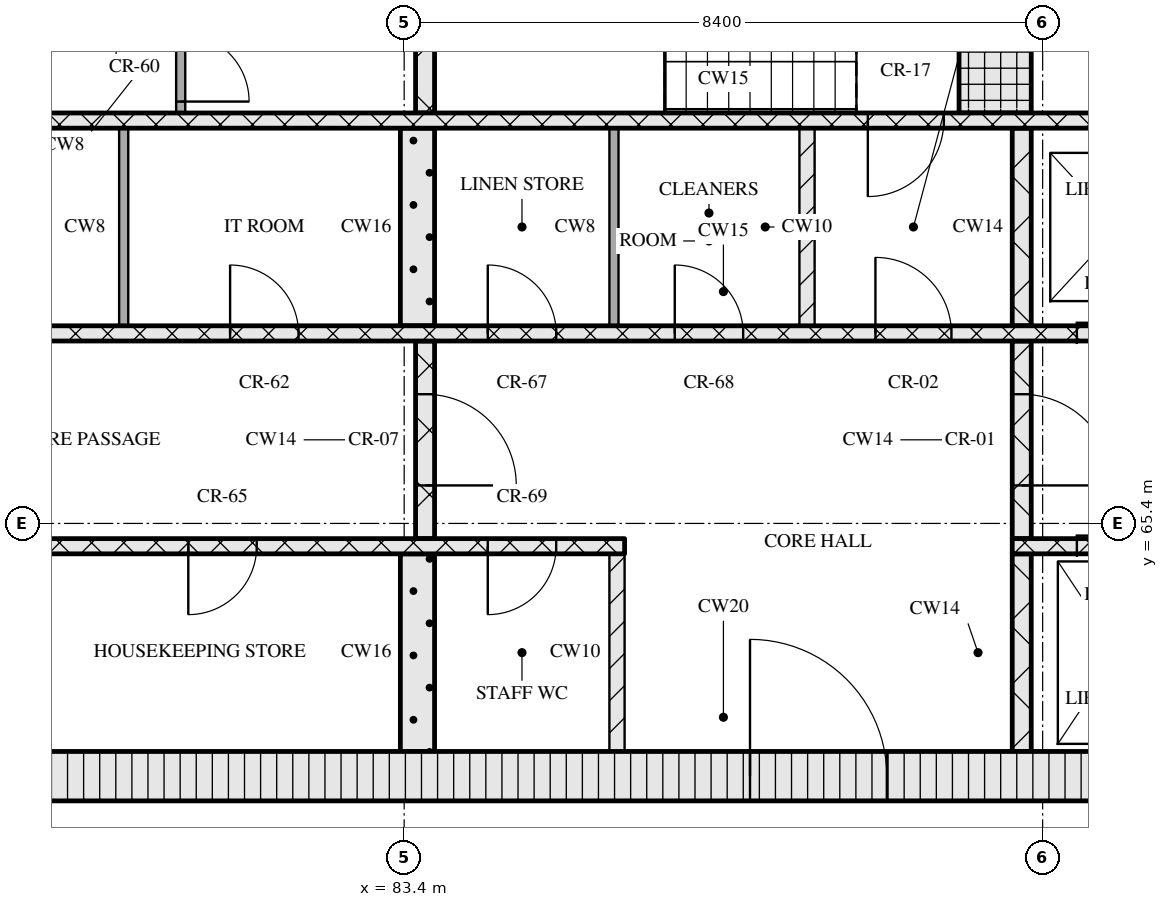
"""IFC4 building model, lengths in metres.
Left out: names, types, materials, properties, quantities, classifications, styles, units other than length and angle.
Written with IfcOpenShell. Run it as: python <this file> out.ifc"""

import sys

from ifc_helpers import new_model, si_unit, direction, frame, frame_2d, origin, place, context, subcontext, project, spatial, rectangle, extrude, element, fill, save


model = new_model("IFC4")
c1 = context("Model", 3, precision=1e-05, world=origin(), true_north=direction((0.0, 1.0)))
c2 = subcontext(c1, "Body", "Model", "MODEL_VIEW")
j1 = project(units=[si_unit("LENGTHUNIT", "METRE"), si_unit("PLANEANGLEUNIT", "RADIAN")], contexts=[c1])
p1 = place(None, origin())
s1 = spatial("IfcSite", under=j1, at=p1, CompositionType="ELEMENT")
p2 = place(p1, origin())
s2 = spatial("IfcBuilding", under=s1, at=p2, CompositionType="ELEMENT")
p3 = place(p2, frame((0.0, 0.0, 230.7)))
s3 = spatial("IfcBuildingStorey", under=s2, at=p3, CompositionType="ELEMENT", Elevation=230.7)
p4 = place(p3, frame((67.15, 62.075, 0.0), z_axis=(0.0, 0.0, 1.0), x_axis=(1.0, 0.0, 0.0)))
e1 = element("IfcWall", 1, at=p4, inside=s3, PredefinedType="SOLIDWALL", context=c2, shape_type="SweptSolid", body=[
    extrude(rectangle(XDim=40.9, YDim=0.65, at=frame_2d((20.45, 0.0))), origin(), (0.0, 0.0, 1.0), 3.32),
])
p5 = place(p4, frame((20.8, 0.0, 0.0)))
e2 = element("IfcOpeningElement", 2, at=p5, cuts=e1, PredefinedType="OPENING", context=c2, shape_type="SweptSolid", body=[
    extrude(rectangle(XDim=1.8, YDim=2.1, at=frame_2d((0.9, 1.05))), frame((0.0, 0.335, 0.0), z_axis=(0.0, -1.0, 0.0), x_axis=(1.0, 0.0, 0.0)), (0.0, 0.0, 1.0), 0.67),
])
p6 = place(p3, frame((83.575, 62.4, 0.0), z_axis=(0.0, 0.0, 1.0), x_axis=(0.0, 1.0, 0.0)))
e3 = element("IfcWall", 3, at=p6, inside=s3, PredefinedType="SOLIDWALL", context=c2, shape_type="SweptSolid", body=[
    extrude(rectangle(XDim=2.6, YDim=0.45, at=frame_2d((1.3, 0.0))), origin(), (0.0, 0.0, 1.0), 3.32),
])
p7 = place(p3, frame((86.2, 62.4, 0.0), z_axis=(0.0, 0.0, 1.0), x_axis=(0.0, 1.0, 0.0)))
e4 = element("IfcWall", 4, at=p7, inside=s3, PredefinedType="PARTITIONING", context=c2, shape_type="SweptSolid", body=[
    extrude(rectangle(XDim=2.6, YDim=0.2, at=frame_2d((1.3, 0.0))), origin(), (0.0, 0.0, 1.0), 3.32),
])
p8 = place(p3, frame((91.525, 62.4, 0.0), z_axis=(0.0, 0.0, 1.0), x_axis=(0.0, 1.0, 0.0)))
e5 = element("IfcWall", 5, at=p8, inside=s3, PredefinedType="SOLIDWALL", context=c2, shape_type="SweptSolid", body=[
    extrude(rectangle(XDim=2.6, YDim=0.25, at=frame_2d((1.3, 0.0))), origin(), (0.0, 0.0, 1.0), 3.32),
])
p9 = place(p3, frame((67.8, 65.1, 0.0), z_axis=(0.0, 0.0, 1.0), x_axis=(1.0, 0.0, 0.0)))
e6 = element("IfcWall", 6, at=p9, inside=s3, PredefinedType="SOLIDWALL", context=c2, shape_type="SweptSolid", body=[
    extrude(rectangle(XDim=18.5, YDim=0.2, at=frame_2d((9.25, 0.0))), origin(), (0.0, 0.0, 1.0), 3.32),
])
p10 = place(p9, frame((7.27, 0.0, 0.0)))
e7 = element("IfcOpeningElement", 7, at=p10, cuts=e6, PredefinedType="OPENING", context=c2, shape_type="SweptSolid", body=[
    extrude(rectangle(XDim=0.9, YDim=2.1, at=frame_2d((0.45, 1.05))), frame((0.0, 0.11, 0.0), z_axis=(0.0, -1.0, 0.0), x_axis=(1.0, 0.0, 0.0)), (0.0, 0.0, 1.0), 0.22),
])
p11 = place(p9, frame((9.05, 0.0, 0.0)))
e8 = element("IfcOpeningElement", 8, at=p11, cuts=e6, PredefinedType="OPENING", context=c2, shape_type="SweptSolid", body=[
    extrude(rectangle(XDim=0.9, YDim=2.1, at=frame_2d((0.45, 1.05))), frame((0.0, 0.11, 0.0), z_axis=(0.0, -1.0, 0.0), x_axis=(1.0, 0.0, 0.0)), (0.0, 0.0, 1.0), 0.22),
])
p12 = place(p9, frame((12.76, 0.0, 0.0)))
e9 = element("IfcOpeningElement", 9, at=p12, cuts=e6, PredefinedType="OPENING", context=c2, shape_type="SweptSolid", body=[
    extrude(rectangle(XDim=0.9, YDim=2.1, at=frame_2d((0.45, 1.05))), frame((0.0, 0.11, 0.0), z_axis=(0.0, -1.0, 0.0), x_axis=(1.0, 0.0, 0.0)), (0.0, 0.0, 1.0), 0.22),
])
p13 = place(p9, frame((16.7, 0.0, 0.0)))
e10 = element("IfcOpeningElement", 10, at=p13, cuts=e6, PredefinedType="OPENING", context=c2, shape_type="SweptSolid", body=[
    extrude(rectangle(XDim=0.9, YDim=2.1, at=frame_2d((0.45, 1.05))), frame((0.0, 0.11, 0.0), z_axis=(0.0, -1.0, 0.0), x_axis=(1.0, 0.0, 0.0)), (0.0, 0.0, 1.0), 0.22),
])
p14 = place(p3, frame((91.4, 65.1, 0.0), z_axis=(0.0, 0.0, 1.0), x_axis=(1.0, 0.0, 0.0)))
e11 = element("IfcWall", 11, at=p14, inside=s3, PredefinedType="SOLIDWALL", context=c2, shape_type="SweptSolid", body=[
    extrude(rectangle(XDim=16.0, YDim=0.2, at=frame_2d((8.0, 0.0))), origin(), (0.0, 0.0, 1.0), 3.32),
])
p15 = place(p14, frame((0.85, 0.0, 0.0)))
e12 = element("IfcOpeningElement", 12, at=p15, cuts=e11, PredefinedType="OPENING", context=c2, shape_type="SweptSolid", body=[
    extrude(rectangle(XDim=1.1, YDim=2.1, at=frame_2d((0.55, 1.05))), frame((0.0, 0.11, 0.0), z_axis=(0.0, -1.0, 0.0), x_axis=(1.0, 0.0, 0.0)), (0.0, 0.0, 1.0), 0.22),
])
p16 = place(p14, frame((3.35, 0.0, 0.0)))
e13 = element("IfcOpeningElement", 13, at=p16, cuts=e11, PredefinedType="OPENING", context=c2, shape_type="SweptSolid", body=[
    extrude(rectangle(XDim=1.1, YDim=2.1, at=frame_2d((0.55, 1.05))), frame((0.0, 0.11, 0.0), z_axis=(0.0, -1.0, 0.0), x_axis=(1.0, 0.0, 0.0)), (0.0, 0.0, 1.0), 0.22),
])
p17 = place(p14, frame((5.85, 0.0, 0.0)))
e14 = element("IfcOpeningElement", 14, at=p17, cuts=e11, PredefinedType="OPENING", context=c2, shape_type="SweptSolid", body=[
    extrude(rectangle(XDim=1.1, YDim=2.1, at=frame_2d((0.55, 1.05))), frame((0.0, 0.11, 0.0), z_axis=(0.0, -1.0, 0.0), x_axis=(1.0, 0.0, 0.0)), (0.0, 0.0, 1.0), 0.22),
])
p18 = place(p14, frame((7.83, 0.0, 0.0)))
e15 = element("IfcOpeningElement", 15, at=p18, cuts=e11, PredefinedType="OPENING", context=c2, shape_type="SweptSolid", body=[
    extrude(rectangle(XDim=0.9, YDim=2.1, at=frame_2d((0.45, 1.05))), frame((0.0, 0.11, 0.0), z_axis=(0.0, -1.0, 0.0), x_axis=(1.0, 0.0, 0.0)), (0.0, 0.0, 1.0), 0.22),
])
p19 = place(p3, frame((83.675, 65.2, 0.0), z_axis=(0.0, 0.0, 1.0), x_axis=(0.0, 1.0, 0.0)))
e16 = element("IfcWall", 16, at=p19, inside=s3, PredefinedType="SOLIDWALL", context=c2, shape_type="SweptSolid", body=[
    extrude(rectangle(XDim=2.6, YDim=0.25, at=frame_2d((1.3, 0.0))), origin(), (0.0, 0.0, 1.0), 3.32),
])
p20 = place(p19, frame((0.7, 0.0, 0.0)))
e17 = element("IfcOpeningElement", 17, at=p20, cuts=e16, PredefinedType="OPENING", context=c2, shape_type="SweptSolid", body=[
    extrude(rectangle(XDim=1.2, YDim=2.1, at=frame_2d((0.6, 1.05))), frame((0.0, 0.135, 0.0), z_axis=(0.0, -1.0, 0.0), x_axis=(1.0, 0.0, 0.0)), (0.0, 0.0, 1.0), 0.27),
])
p21 = place(p3, frame((91.525, 65.2, 0.0), z_axis=(0.0, 0.0, 1.0), x_axis=(0.0, 1.0, 0.0)))
e18 = element("IfcWall", 18, at=p21, inside=s3, PredefinedType="SOLIDWALL", context=c2, shape_type="SweptSolid", body=[
    extrude(rectangle(XDim=2.6, YDim=0.25, at=frame_2d((1.3, 0.0))), origin(), (0.0, 0.0, 1.0), 3.32),
])
p22 = place(p21, frame((0.7, 0.0, 0.0)))
e19 = element("IfcOpeningElement", 19, at=p22, cuts=e18, PredefinedType="OPENING", context=c2, shape_type="SweptSolid", body=[
    extrude(rectangle(XDim=1.2, YDim=2.1, at=frame_2d((0.6, 1.05))), frame((0.0, 0.135, 0.0), z_axis=(0.0, -1.0, 0.0), x_axis=(1.0, 0.0, 0.0)), (0.0, 0.0, 1.0), 0.27),
])
p23 = place(p3, frame((76.05, 67.9, 0.0), z_axis=(0.0, 0.0, 1.0), x_axis=(1.0, 0.0, 0.0)))
e20 = element("IfcWall", 20, at=p23, inside=s3, PredefinedType="SOLIDWALL", context=c2, shape_type="SweptSolid", body=[
    extrude(rectangle(XDim=23.1, YDim=0.2, at=frame_2d((11.55, 0.0))), origin(), (0.0, 0.0, 1.0), 3.32),
])
p24 = place(p23, frame((1.35, 0.0, 0.0)))
e21 = element("IfcOpeningElement", 21, at=p24, cuts=e20, PredefinedType="OPENING", context=c2, shape_type="SweptSolid", body=[
    extrude(rectangle(XDim=0.9, YDim=2.1, at=frame_2d((0.45, 1.05))), frame((0.0, 0.11, 0.0), z_axis=(0.0, -1.0, 0.0), x_axis=(1.0, 0.0, 0.0)), (0.0, 0.0, 1.0), 0.22),
])
p25 = place(p23, frame((5.06, 0.0, 0.0)))
e22 = element("IfcOpeningElement", 22, at=p25, cuts=e20, PredefinedType="OPENING", context=c2, shape_type="SweptSolid", body=[
    extrude(rectangle(XDim=0.9, YDim=2.1, at=frame_2d((0.45, 1.05))), frame((0.0, 0.11, 0.0), z_axis=(0.0, -1.0, 0.0), x_axis=(1.0, 0.0, 0.0)), (0.0, 0.0, 1.0), 0.22),
])
p26 = place(p23, frame((8.45, 0.0, 0.0)))
e23 = element("IfcOpeningElement", 23, at=p26, cuts=e20, PredefinedType="OPENING", context=c2, shape_type="SweptSolid", body=[
    extrude(rectangle(XDim=0.9, YDim=2.1, at=frame_2d((0.45, 1.05))), frame((0.0, 0.11, 0.0), z_axis=(0.0, -1.0, 0.0), x_axis=(1.0, 0.0, 0.0)), (0.0, 0.0, 1.0), 0.22),
])
p27 = place(p23, frame((10.91, 0.0, 0.0)))
e24 = element("IfcOpeningElement", 24, at=p27, cuts=e20, PredefinedType="OPENING", context=c2, shape_type="SweptSolid", body=[
    extrude(rectangle(XDim=0.9, YDim=2.1, at=frame_2d((0.45, 1.05))), frame((0.0, 0.11, 0.0), z_axis=(0.0, -1.0, 0.0), x_axis=(1.0, 0.0, 0.0)), (0.0, 0.0, 1.0), 0.22),
])
p28 = place(p23, frame((13.55, 0.0, 0.0)))
e25 = element("IfcOpeningElement", 25, at=p28, cuts=e20, PredefinedType="OPENING", context=c2, shape_type="SweptSolid", body=[
    extrude(rectangle(XDim=1.0, YDim=2.1, at=frame_2d((0.5, 1.05))), frame((0.0, 0.11, 0.0), z_axis=(0.0, -1.0, 0.0), x_axis=(1.0, 0.0, 0.0)), (0.0, 0.0, 1.0), 0.22),
])
p29 = place(p23, frame((16.2, 0.0, 0.0)))
e26 = element("IfcOpeningElement", 26, at=p29, cuts=e20, PredefinedType="OPENING", context=c2, shape_type="SweptSolid", body=[
    extrude(rectangle(XDim=1.1, YDim=2.1, at=frame_2d((0.55, 1.05))), frame((0.0, 0.11, 0.0), z_axis=(0.0, -1.0, 0.0), x_axis=(1.0, 0.0, 0.0)), (0.0, 0.0, 1.0), 0.22),
])
p30 = place(p23, frame((18.7, 0.0, 0.0)))
e27 = element("IfcOpeningElement", 27, at=p30, cuts=e20, PredefinedType="OPENING", context=c2, shape_type="SweptSolid", body=[
    extrude(rectangle(XDim=1.1, YDim=2.1, at=frame_2d((0.55, 1.05))), frame((0.0, 0.11, 0.0), z_axis=(0.0, -1.0, 0.0), x_axis=(1.0, 0.0, 0.0)), (0.0, 0.0, 1.0), 0.22),
])
p31 = place(p23, frame((21.2, 0.0, 0.0)))
e28 = element("IfcOpeningElement", 28, at=p31, cuts=e20, PredefinedType="OPENING", context=c2, shape_type="SweptSolid", body=[
    extrude(rectangle(XDim=1.1, YDim=2.1, at=frame_2d((0.55, 1.05))), frame((0.0, 0.11, 0.0), z_axis=(0.0, -1.0, 0.0), x_axis=(1.0, 0.0, 0.0)), (0.0, 0.0, 1.0), 0.22),
])
p32 = place(p3, frame((79.71, 68.0, 0.0), z_axis=(0.0, 0.0, 1.0), x_axis=(0.0, 1.0, 0.0)))
e29 = element("IfcWall", 29, at=p32, inside=s3, PredefinedType="PARTITIONING", context=c2, shape_type="SweptSolid", body=[
    extrude(rectangle(XDim=2.6, YDim=0.12, at=frame_2d((1.3, 0.0))), origin(), (0.0, 0.0, 1.0), 3.32),
])
p33 = place(p3, frame((83.575, 68.0, 0.0), z_axis=(0.0, 0.0, 1.0), x_axis=(0.0, 1.0, 0.0)))
e30 = element("IfcWall", 30, at=p33, inside=s3, PredefinedType="SOLIDWALL", context=c2, shape_type="SweptSolid", body=[
    extrude(rectangle(XDim=2.6, YDim=0.45, at=frame_2d((1.3, 0.0))), origin(), (0.0, 0.0, 1.0), 3.32),
])
p34 = place(p3, frame((86.16, 68.0, 0.0), z_axis=(0.0, 0.0, 1.0), x_axis=(0.0, 1.0, 0.0)))
e31 = element("IfcWall", 31, at=p34, inside=s3, PredefinedType="PARTITIONING", context=c2, shape_type="SweptSolid", body=[
    extrude(rectangle(XDim=2.6, YDim=0.12, at=frame_2d((1.3, 0.0))), origin(), (0.0, 0.0, 1.0), 3.32),
])
p35 = place(p3, frame((88.7, 68.0, 0.0), z_axis=(0.0, 0.0, 1.0), x_axis=(0.0, 1.0, 0.0)))
e32 = element("IfcWall", 32, at=p35, inside=s3, PredefinedType="PARTITIONING", context=c2, shape_type="SweptSolid", body=[
    extrude(rectangle(XDim=2.6, YDim=0.2, at=frame_2d((1.3, 0.0))), origin(), (0.0, 0.0, 1.0), 3.32),
])
p36 = place(p3, frame((91.525, 68.0, 0.0), z_axis=(0.0, 0.0, 1.0), x_axis=(0.0, 1.0, 0.0)))
e33 = element("IfcWall", 33, at=p36, inside=s3, PredefinedType="SOLIDWALL", context=c2, shape_type="SweptSolid", body=[
    extrude(rectangle(XDim=2.6, YDim=0.25, at=frame_2d((1.3, 0.0))), origin(), (0.0, 0.0, 1.0), 3.32),
])
p37 = place(p3, frame((67.8, 70.7, 0.0), z_axis=(0.0, 0.0, 1.0), x_axis=(1.0, 0.0, 0.0)))
e34 = element("IfcWall", 34, at=p37, inside=s3, PredefinedType="SOLIDWALL", context=c2, shape_type="SweptSolid", body=[
    extrude(rectangle(XDim=39.6, YDim=0.2, at=frame_2d((19.8, 0.0))), origin(), (0.0, 0.0, 1.0), 3.32),
])
p38 = place(p37, frame((0.65, 0.0, 0.0)))
e35 = element("IfcOpeningElement", 35, at=p38, cuts=e34, PredefinedType="OPENING", context=c2, shape_type="SweptSolid", body=[
    extrude(rectangle(XDim=1.1, YDim=2.1, at=frame_2d((0.55, 1.05))), frame((0.0, 0.11, 0.0), z_axis=(0.0, -1.0, 0.0), x_axis=(1.0, 0.0, 0.0)), (0.0, 0.0, 1.0), 0.22),
])
p39 = place(p37, frame((3.25, 0.0, 0.0)))
e36 = element("IfcOpeningElement", 36, at=p39, cuts=e34, PredefinedType="OPENING", context=c2, shape_type="SweptSolid", body=[
    extrude(rectangle(XDim=1.1, YDim=2.1, at=frame_2d((0.55, 1.05))), frame((0.0, 0.11, 0.0), z_axis=(0.0, -1.0, 0.0), x_axis=(1.0, 0.0, 0.0)), (0.0, 0.0, 1.0), 0.22),
])
p40 = place(p37, frame((5.9, 0.0, 0.0)))
e37 = element("IfcOpeningElement", 37, at=p40, cuts=e34, PredefinedType="OPENING", context=c2, shape_type="SweptSolid", body=[
    extrude(rectangle(XDim=1.0, YDim=2.1, at=frame_2d((0.5, 1.05))), frame((0.0, 0.11, 0.0), z_axis=(0.0, -1.0, 0.0), x_axis=(1.0, 0.0, 0.0)), (0.0, 0.0, 1.0), 0.22),
])
p41 = place(p37, frame((21.7, 0.0, 0.0)))
e38 = element("IfcOpeningElement", 38, at=p41, cuts=e34, PredefinedType="OPENING", context=c2, shape_type="SweptSolid", body=[
    extrude(rectangle(XDim=1.0, YDim=2.1, at=frame_2d((0.5, 1.05))), frame((0.0, 0.11, 0.0), z_axis=(0.0, -1.0, 0.0), x_axis=(1.0, 0.0, 0.0)), (0.0, 0.0, 1.0), 0.22),
])
p42 = place(p37, frame((32.7, 0.0, 0.0)))
e39 = element("IfcOpeningElement", 39, at=p42, cuts=e34, PredefinedType="OPENING", context=c2, shape_type="SweptSolid", body=[
    extrude(rectangle(XDim=1.0, YDim=2.1, at=frame_2d((0.5, 1.05))), frame((0.0, 0.11, 0.0), z_axis=(0.0, -1.0, 0.0), x_axis=(1.0, 0.0, 0.0)), (0.0, 0.0, 1.0), 0.22),
])
p43 = place(p37, frame((35.25, 0.0, 0.0)))
e40 = element("IfcOpeningElement", 40, at=p43, cuts=e34, PredefinedType="OPENING", context=c2, shape_type="SweptSolid", body=[
    extrude(rectangle(XDim=1.1, YDim=2.1, at=frame_2d((0.55, 1.05))), frame((0.0, 0.11, 0.0), z_axis=(0.0, -1.0, 0.0), x_axis=(1.0, 0.0, 0.0)), (0.0, 0.0, 1.0), 0.22),
])
p44 = place(p37, frame((37.85, 0.0, 0.0)))
e41 = element("IfcOpeningElement", 41, at=p44, cuts=e34, PredefinedType="OPENING", context=c2, shape_type="SweptSolid", body=[
    extrude(rectangle(XDim=1.1, YDim=2.1, at=frame_2d((0.55, 1.05))), frame((0.0, 0.11, 0.0), z_axis=(0.0, -1.0, 0.0), x_axis=(1.0, 0.0, 0.0)), (0.0, 0.0, 1.0), 0.22),
])
p45 = place(p3, frame((80.46, 70.8, 0.0), z_axis=(0.0, 0.0, 1.0), x_axis=(0.0, 1.0, 0.0)))
e42 = element("IfcWall", 42, at=p45, inside=s3, PredefinedType="PARTITIONING", context=c2, shape_type="SweptSolid", body=[
    extrude(rectangle(XDim=1.2, YDim=0.12, at=frame_2d((0.6, 0.0))), origin(), (0.0, 0.0, 1.0), 3.32),
])
p46 = place(p45, frame((0.15, 0.0, 0.0)))
e43 = element("IfcOpeningElement", 43, at=p46, cuts=e42, PredefinedType="OPENING", context=c2, shape_type="SweptSolid", body=[
    extrude(rectangle(XDim=0.9, YDim=2.1, at=frame_2d((0.45, 1.05))), frame((0.0, 0.07, 0.0), z_axis=(0.0, -1.0, 0.0), x_axis=(1.0, 0.0, 0.0)), (0.0, 0.0, 1.0), 0.14),
])
p47 = place(p3, frame((83.675, 70.8, 0.0), z_axis=(0.0, 0.0, 1.0), x_axis=(0.0, 1.0, 0.0)))
e44 = element("IfcWall", 44, at=p47, inside=s3, PredefinedType="SOLIDWALL", context=c2, shape_type="SweptSolid", body=[
    extrude(rectangle(XDim=2.95, YDim=0.25, at=frame_2d((1.475, 0.0))), origin(), (0.0, 0.0, 1.0), 3.32),
])
p48 = place(p3, frame((91.175, 70.8, 0.0), z_axis=(0.0, 0.0, 1.0), x_axis=(0.0, 1.0, 0.0)))
e45 = element("IfcWall", 45, at=p48, inside=s3, PredefinedType="SOLIDWALL", context=c2, shape_type="SweptSolid", body=[
    extrude(rectangle(XDim=2.95, YDim=0.95, at=frame_2d((1.475, 0.0))), origin(), (0.0, 0.0, 1.0), 3.32),
])
p49 = place(p5, origin())
e46 = element("IfcDoor", 46, at=p49, inside=s3, OperationType="DOUBLE_DOOR_SINGLE_SWING", PredefinedType="DOOR", context=c2, shape_type="SweptSolid", body=[
    extrude(rectangle(XDim=1.8, YDim=2.1, at=frame_2d((0.9, 1.05))), frame((0.0, 0.025, 0.0), z_axis=(0.0, -1.0, 0.0), x_axis=(1.0, 0.0, 0.0)), (0.0, 0.0, 1.0), 0.05),
])
fill(e2, e46)
p50 = place(p12, origin())
e47 = element("IfcDoor", 47, at=p50, inside=s3, OperationType="SINGLE_SWING_RIGHT", PredefinedType="DOOR", context=c2, shape_type="SweptSolid", body=[
    extrude(rectangle(XDim=0.9, YDim=2.1, at=frame_2d((0.45, 1.05))), frame((0.0, 0.025, 0.0), z_axis=(0.0, -1.0, 0.0), x_axis=(1.0, 0.0, 0.0)), (0.0, 0.0, 1.0), 0.05),
])
fill(e9, e47)
p51 = place(p13, origin())
e48 = element("IfcDoor", 48, at=p51, inside=s3, OperationType="SINGLE_SWING_RIGHT", PredefinedType="DOOR", context=c2, shape_type="SweptSolid", body=[
    extrude(rectangle(XDim=0.9, YDim=2.1, at=frame_2d((0.45, 1.05))), frame((0.0, 0.025, 0.0), z_axis=(0.0, -1.0, 0.0), x_axis=(1.0, 0.0, 0.0)), (0.0, 0.0, 1.0), 0.05),
])
fill(e10, e48)
p52 = place(p15, origin())
e49 = element("IfcDoor", 49, at=p52, inside=s3, OperationType="SLIDING_TO_LEFT", PredefinedType="DOOR", context=c2, shape_type="SweptSolid", body=[
    extrude(rectangle(XDim=1.1, YDim=2.1, at=frame_2d((0.55, 1.05))), frame((0.0, 0.025, 0.0), z_axis=(0.0, -1.0, 0.0), x_axis=(1.0, 0.0, 0.0)), (0.0, 0.0, 1.0), 0.05),
])
fill(e12, e49)
p53 = place(p20, origin())
e50 = element("IfcDoor", 50, at=p53, inside=s3, OperationType="SINGLE_SWING_RIGHT", PredefinedType="DOOR", context=c2, shape_type="SweptSolid", body=[
    extrude(rectangle(XDim=1.2, YDim=2.1, at=frame_2d((0.6, 1.05))), frame((0.0, 0.025, 0.0), z_axis=(0.0, -1.0, 0.0), x_axis=(1.0, 0.0, 0.0)), (0.0, 0.0, 1.0), 0.05),
])
fill(e17, e50)
p54 = place(p22, origin())
e51 = element("IfcDoor", 51, at=p54, inside=s3, OperationType="SINGLE_SWING_RIGHT", PredefinedType="DOOR", context=c2, shape_type="SweptSolid", body=[
    extrude(rectangle(XDim=1.2, YDim=2.1, at=frame_2d((0.6, 1.05))), frame((0.0, 0.025, 0.0), z_axis=(0.0, -1.0, 0.0), x_axis=(1.0, 0.0, 0.0)), (0.0, 0.0, 1.0), 0.05),
])
fill(e19, e51)
p55 = place(p25, origin())
e52 = element("IfcDoor", 52, at=p55, inside=s3, OperationType="SINGLE_SWING_LEFT", PredefinedType="DOOR", context=c2, shape_type="SweptSolid", body=[
    extrude(rectangle(XDim=0.9, YDim=2.1, at=frame_2d((0.45, 1.05))), frame((0.0, 0.025, 0.0), z_axis=(0.0, -1.0, 0.0), x_axis=(1.0, 0.0, 0.0)), (0.0, 0.0, 1.0), 0.05),
])
fill(e22, e52)
p56 = place(p26, origin())
e53 = element("IfcDoor", 53, at=p56, inside=s3, OperationType="SINGLE_SWING_LEFT", PredefinedType="DOOR", context=c2, shape_type="SweptSolid", body=[
    extrude(rectangle(XDim=0.9, YDim=2.1, at=frame_2d((0.45, 1.05))), frame((0.0, 0.025, 0.0), z_axis=(0.0, -1.0, 0.0), x_axis=(1.0, 0.0, 0.0)), (0.0, 0.0, 1.0), 0.05),
])
fill(e23, e53)
p57 = place(p27, origin())
e54 = element("IfcDoor", 54, at=p57, inside=s3, OperationType="SINGLE_SWING_LEFT", PredefinedType="DOOR", context=c2, shape_type="SweptSolid", body=[
    extrude(rectangle(XDim=0.9, YDim=2.1, at=frame_2d((0.45, 1.05))), frame((0.0, 0.025, 0.0), z_axis=(0.0, -1.0, 0.0), x_axis=(1.0, 0.0, 0.0)), (0.0, 0.0, 1.0), 0.05),
])
fill(e24, e54)
p58 = place(p28, origin())
e55 = element("IfcDoor", 55, at=p58, inside=s3, OperationType="SINGLE_SWING_LEFT", PredefinedType="DOOR", context=c2, shape_type="SweptSolid", body=[
    extrude(rectangle(XDim=1.0, YDim=2.1, at=frame_2d((0.5, 1.05))), frame((0.0, 0.025, 0.0), z_axis=(0.0, -1.0, 0.0), x_axis=(1.0, 0.0, 0.0)), (0.0, 0.0, 1.0), 0.05),
])
fill(e25, e55)
p59 = place(p29, origin())
e56 = element("IfcDoor", 56, at=p59, inside=s3, OperationType="SLIDING_TO_RIGHT", PredefinedType="DOOR", context=c2, shape_type="SweptSolid", body=[
    extrude(rectangle(XDim=1.1, YDim=2.1, at=frame_2d((0.55, 1.05))), frame((0.0, 0.025, 0.0), z_axis=(0.0, -1.0, 0.0), x_axis=(1.0, 0.0, 0.0)), (0.0, 0.0, 1.0), 0.05),
])
fill(e26, e56)
p60 = place(p41, origin())
e57 = element("IfcDoor", 57, at=p60, inside=s3, OperationType="SINGLE_SWING_RIGHT", PredefinedType="DOOR", context=c2, shape_type="SweptSolid", body=[
    extrude(rectangle(XDim=1.0, YDim=2.1, at=frame_2d((0.5, 1.05))), frame((0.0, 0.025, 0.0), z_axis=(0.0, -1.0, 0.0), x_axis=(1.0, 0.0, 0.0)), (0.0, 0.0, 1.0), 0.05),
])
fill(e38, e57)
p61 = place(p46, origin())
e58 = element("IfcDoor", 58, at=p61, inside=s3, OperationType="SINGLE_SWING_RIGHT", PredefinedType="DOOR", context=c2, shape_type="SweptSolid", body=[
    extrude(rectangle(XDim=0.9, YDim=2.1, at=frame_2d((0.45, 1.05))), frame((0.0, 0.025, 0.0), z_axis=(0.0, -1.0, 0.0), x_axis=(1.0, 0.0, 0.0)), (0.0, 0.0, 1.0), 0.05),
])
fill(e43, e58)
save(model, sys.argv[1])
